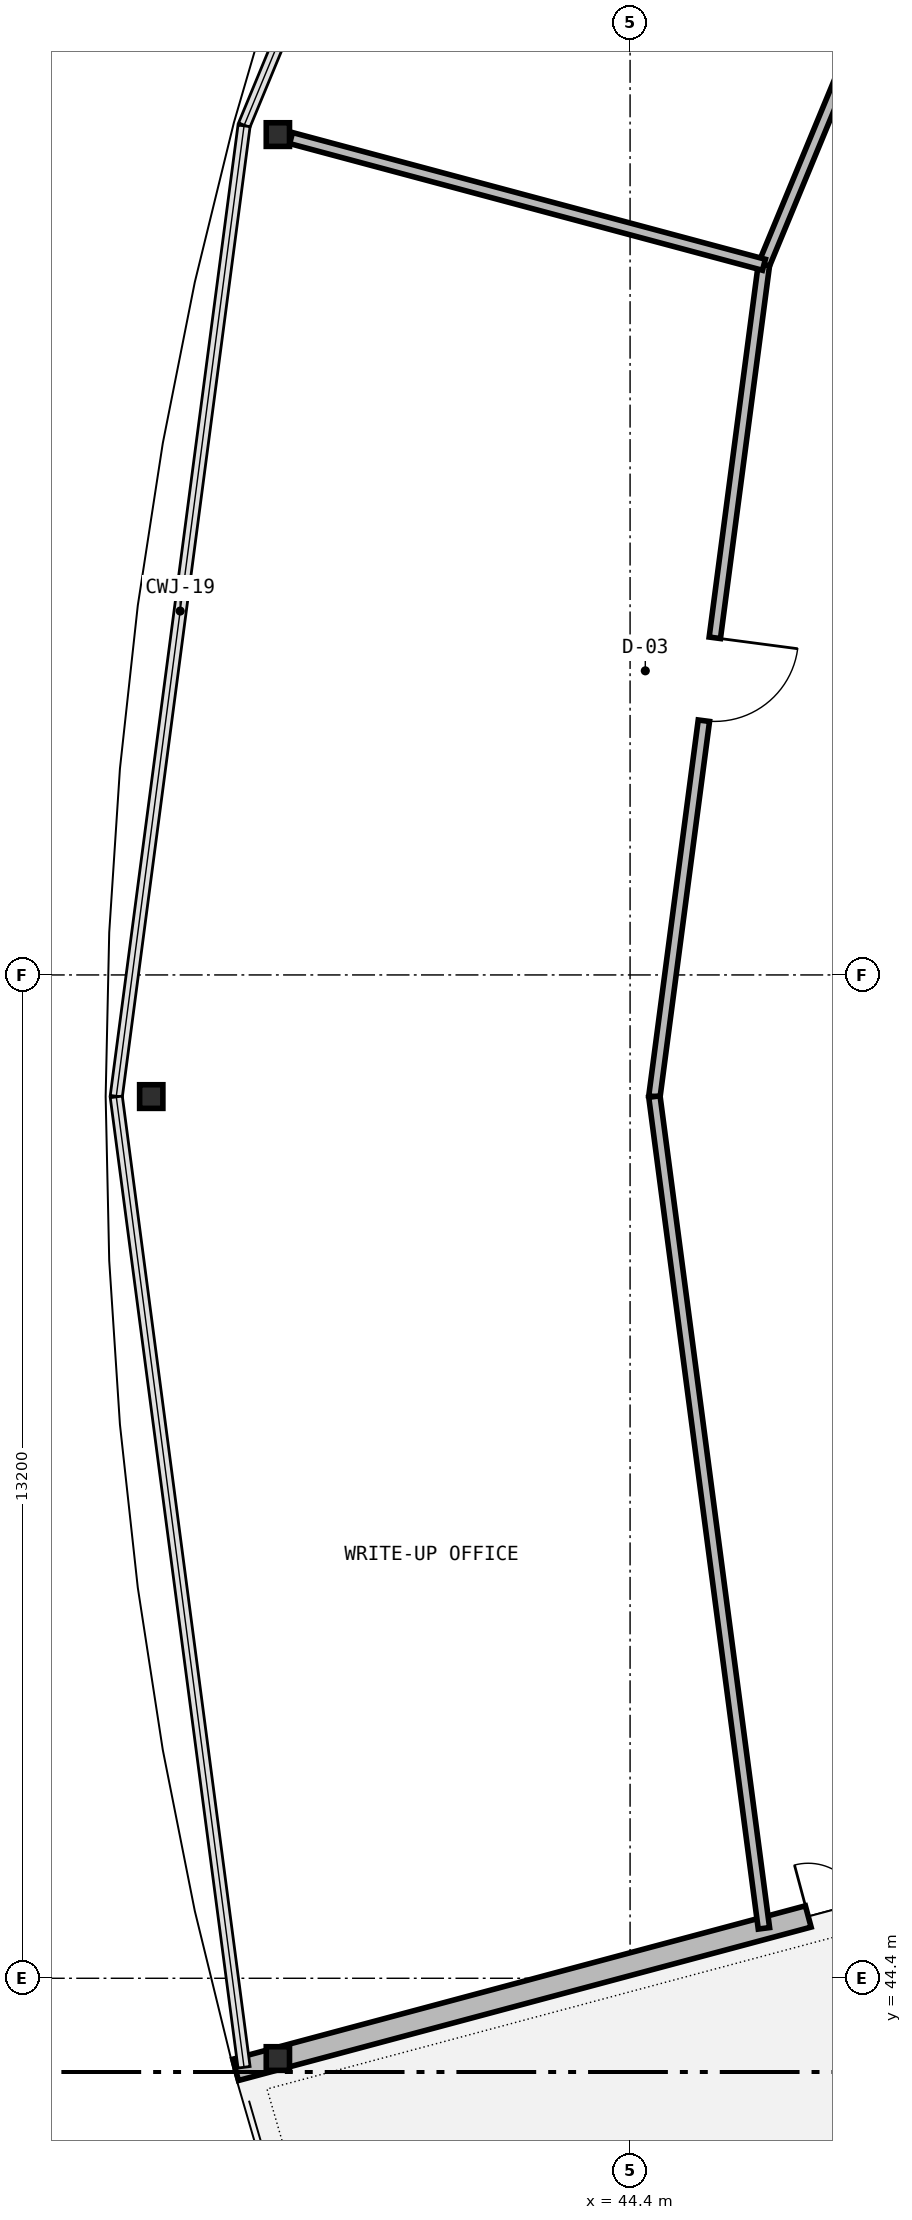
"""IFC4 building model, lengths in metres.
Left out: names, types, materials, properties, quantities, classifications, styles, units other than length and angle.
Written with IfcOpenShell. Run it as: python <this file> out.ifc"""

import sys

from ifc_helpers import new_model, si_unit, direction, frame, frame_2d, origin, origin_2d, place, context, subcontext, project, spatial, rectangle, i_section, extrude, element, fill, save


model = new_model("IFC4")
c1 = context("Model", 3, precision=1e-05, world=origin(), true_north=direction((0.0, 1.0)))
c2 = subcontext(c1, "Body", "Model", "MODEL_VIEW")
j1 = project(units=[si_unit("LENGTHUNIT", "METRE"), si_unit("PLANEANGLEUNIT", "RADIAN")], contexts=[c1])
p1 = place(None, origin())
s1 = spatial("IfcSite", under=j1, at=p1, CompositionType="ELEMENT")
p2 = place(p1, origin())
s2 = spatial("IfcBuilding", under=s1, at=p2, CompositionType="ELEMENT")
p3 = place(p2, frame((0.0, 0.0, 14.35)))
s3 = spatial("IfcBuildingStorey", under=s2, at=p3, CompositionType="ELEMENT", Elevation=14.35)
for number, where, z_axis, x_axis in (
    (1, (39.766, 68.656, 0.0), (0.0, 0.0, 1.0), (1.0, 0.0, 0.0)),
    (2, (38.1, 56.0, 0.0), (0.0, 0.0, 1.0), (1.0, 0.0, 0.0)),
    (3, (39.766, 43.344, 0.0), (0.0, 0.0, 1.0), (1.0, 0.0, 0.0)),
):
    element("IfcColumn", number, at=place(p3, frame(where, z_axis=z_axis, x_axis=x_axis)), inside=s3, PredefinedType="COLUMN", context=c2, shape_type="SweptSolid", body=[
        extrude(i_section(OverallWidth=0.306, OverallDepth=0.311, WebThickness=0.011, FlangeThickness=0.017, at=origin_2d()), origin(), (0.0, 0.0, 1.0), 4.55),
    ])
p4 = place(p3, frame((39.21, 43.195, 0.0), z_axis=(0.0, 0.0, 1.0), x_axis=(0.965941286082, 0.258761341476, 0.0)))
e4 = element("IfcWall", 4, at=p4, inside=s3, PredefinedType="SOLIDWALL", context=c2, shape_type="SweptSolid", body=[
    extrude(rectangle(XDim=10.952, YDim=0.29, at=frame_2d((5.476, 0.0))), origin(), (0.0, 0.0, 1.0), 3.687),
])
p5 = place(p4, frame((7.8, 0.0, 0.0)))
e5 = element("IfcOpeningElement", 5, at=p5, cuts=e4, PredefinedType="OPENING", context=c2, shape_type="SweptSolid", body=[
    extrude(rectangle(XDim=1.4, YDim=2.2, at=frame_2d((0.7, 1.1))), frame((0.0, 0.155, 0.0), z_axis=(0.0, -1.0, 0.0), x_axis=(1.0, 0.0, 0.0)), (0.0, 0.0, 1.0), 0.31),
])
p6 = place(p3, frame((50.384, 77.14, 0.0), z_axis=(0.0, 0.0, 1.0), x_axis=(-0.382644845446, -0.923895514793, 0.0)))
e6 = element("IfcWall", 6, at=p6, inside=s3, PredefinedType="PARTITIONING", context=c2, shape_type="SweptSolid", body=[
    extrude(rectangle(XDim=11.037, YDim=0.15, at=frame_2d((5.518, 0.0))), origin(), (0.0, 0.0, 1.0), 3.691),
])
p7 = place(p3, frame((46.161, 66.943, 0.0), z_axis=(0.0, 0.0, 1.0), x_axis=(-0.130546632054, -0.991442170204, 0.0)))
e7 = element("IfcWall", 7, at=p7, inside=s3, PredefinedType="PARTITIONING", context=c2, shape_type="SweptSolid", body=[
    extrude(rectangle(XDim=11.038, YDim=0.15, at=frame_2d((5.519, 0.0))), origin(), (0.0, 0.0, 1.0), 3.691),
])
p8 = place(p7, frame((4.95, 0.0, 0.0)))
e8 = element("IfcOpeningElement", 8, at=p8, cuts=e7, PredefinedType="OPENING", context=c2, shape_type="SweptSolid", body=[
    extrude(rectangle(XDim=1.1, YDim=2.2, at=frame_2d((0.55, 1.1))), frame((0.0, 0.085, 0.0), z_axis=(0.0, -1.0, 0.0), x_axis=(1.0, 0.0, 0.0)), (0.0, 0.0, 1.0), 0.17),
])
p9 = place(p3, frame((44.72, 56.0, 0.0), z_axis=(0.0, 0.0, 1.0), x_axis=(0.130546632054, -0.991442170204, 0.0)))
e9 = element("IfcWall", 9, at=p9, inside=s3, PredefinedType="PARTITIONING", context=c2, shape_type="SweptSolid", body=[
    extrude(rectangle(XDim=11.038, YDim=0.15, at=frame_2d((5.519, 0.0))), origin(), (0.0, 0.0, 1.0), 3.691),
])
p10 = place(p3, frame((46.161, 66.943, 0.0), z_axis=(0.0, 0.0, 1.0), x_axis=(-0.965922162166, 0.258832719409, 0.0)))
e10 = element("IfcWall", 10, at=p10, inside=s3, PredefinedType="PARTITIONING", context=c2, shape_type="SweptSolid", body=[
    extrude(rectangle(XDim=6.44, YDim=0.15, at=frame_2d((3.22, 0.0))), origin(), (0.0, 0.0, 1.0), 3.691),
])
p11 = place(p5, origin())
e11 = element("IfcDoor", 11, at=p11, inside=s3, OperationType="DOUBLE_DOOR_SINGLE_SWING", PredefinedType="DOOR", context=c2, shape_type="SweptSolid", body=[
    extrude(rectangle(XDim=1.4, YDim=2.2, at=frame_2d((0.7, 1.1))), frame((0.0, 0.025, 0.0), z_axis=(0.0, -1.0, 0.0), x_axis=(1.0, 0.0, 0.0)), (0.0, 0.0, 1.0), 0.05),
])
fill(e5, e11)
p12 = place(p8, origin())
e12 = element("IfcDoor", 12, at=p12, inside=s3, OperationType="SINGLE_SWING_LEFT", PredefinedType="DOOR", context=c2, shape_type="SweptSolid", body=[
    extrude(rectangle(XDim=1.1, YDim=2.2, at=frame_2d((0.55, 1.1))), frame((0.0, 0.025, 0.0), z_axis=(0.0, -1.0, 0.0), x_axis=(1.0, 0.0, 0.0)), (0.0, 0.0, 1.0), 0.05),
])
fill(e8, e12)
save(model, sys.argv[1])
